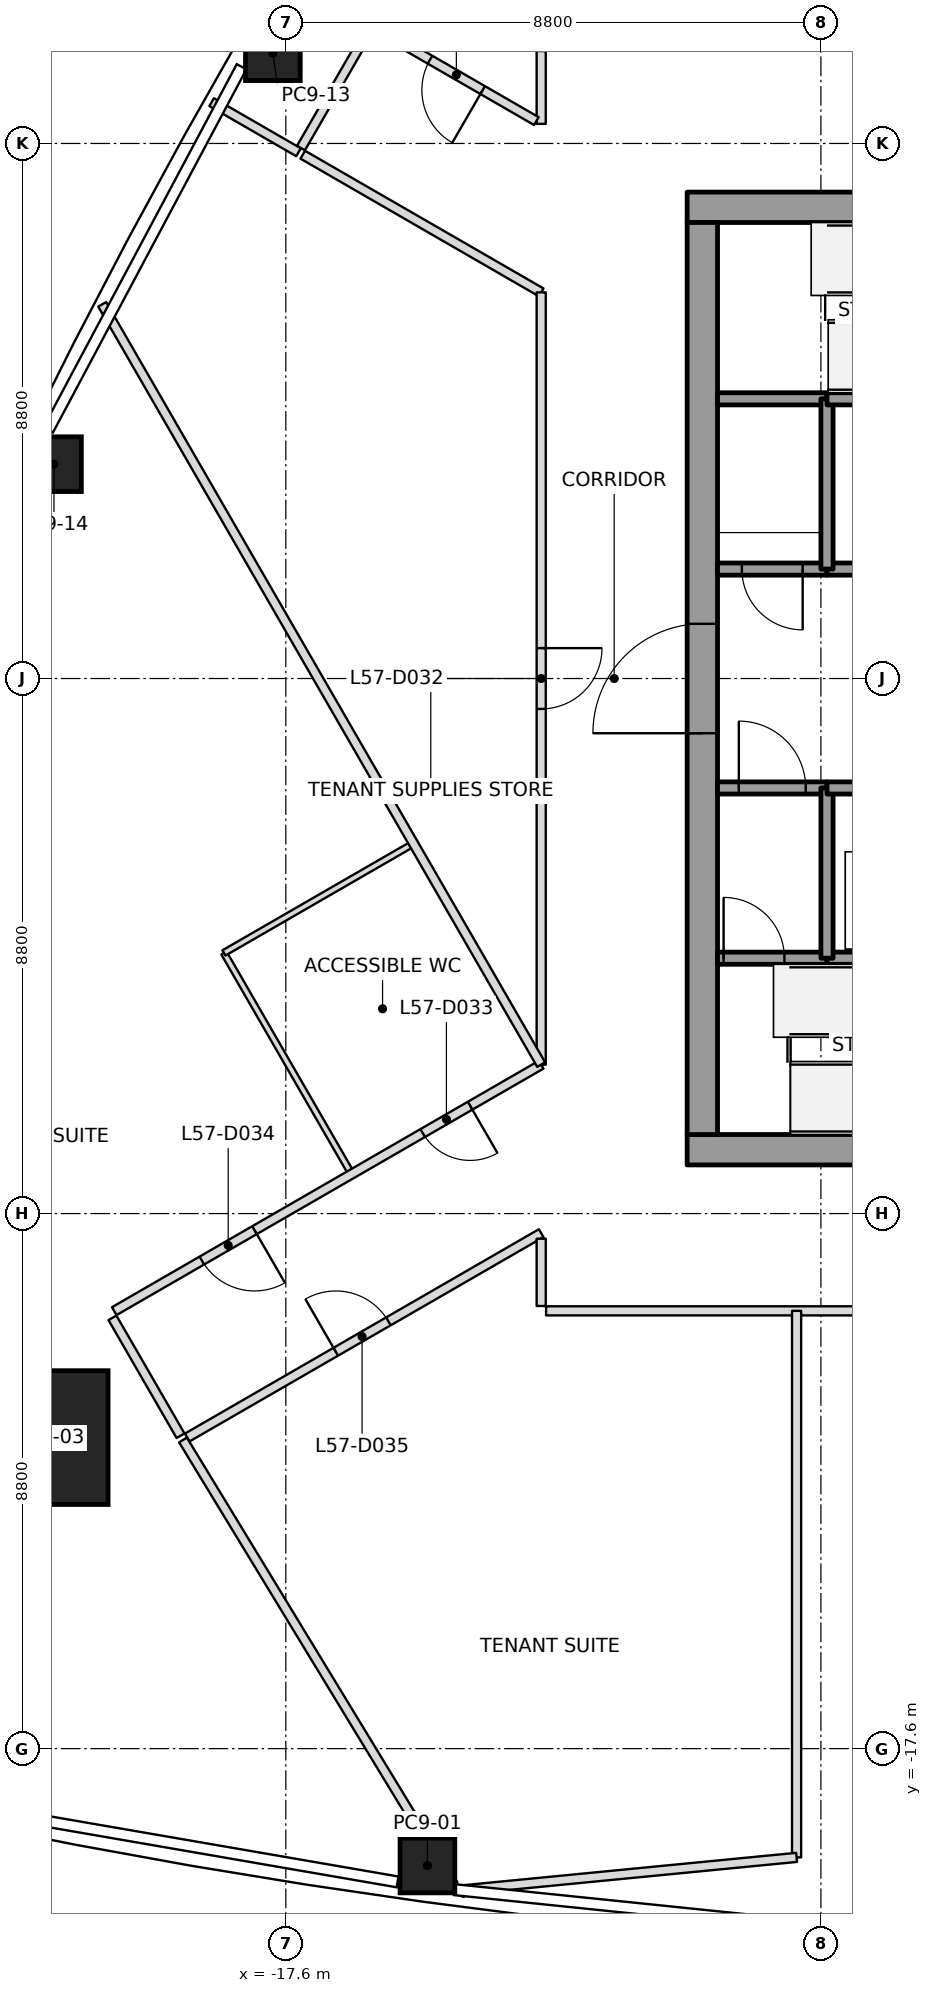
"""IFC4 building model, lengths in metres.
Left out: names, types, materials, properties, quantities, classifications, styles, units other than length and angle.
Written with IfcOpenShell. Run it as: python <this file> out.ifc"""

import sys

from ifc_helpers import new_model, si_unit, direction, frame, frame_2d, origin, origin_2d, place, context, subcontext, project, spatial, rectangle, extrude, element, fill, save


model = new_model("IFC4")
c1 = context("Model", 3, precision=1e-05, world=origin(), true_north=direction((0.0, 1.0)))
c2 = subcontext(c1, "Body", "Model", "MODEL_VIEW")
j1 = project(units=[si_unit("LENGTHUNIT", "METRE"), si_unit("PLANEANGLEUNIT", "RADIAN")], contexts=[c1])
p1 = place(None, origin())
s1 = spatial("IfcSite", under=j1, at=p1, CompositionType="ELEMENT")
p2 = place(p1, origin())
s2 = spatial("IfcBuilding", under=s1, at=p2, CompositionType="ELEMENT")
p3 = place(p2, frame((0.0, 0.0, 255.0)))
s3 = spatial("IfcBuildingStorey", under=s2, at=p3, CompositionType="ELEMENT", Elevation=255.0)
p4 = place(p3, frame((-21.623, -12.484, 0.0), z_axis=(0.027878633223, 0.016043939908, 0.999482553025), x_axis=(0.999611315367, -0.000447457036, -0.02787504211)))
e1 = element("IfcColumn", 1, at=p4, inside=s3, PredefinedType="COLUMN", context=c2, shape_type="SweptSolid", body=[
    extrude(rectangle(XDim=2.2, YDim=2.2, at=origin_2d()), origin(), (0.0, 0.0, 1.0), 4.002),
])
p5 = place(p3, frame((-15.271, -19.522, 0.0), z_axis=(0.017513460473, 0.010373826761, 0.999792809746), x_axis=(-0.990498056196, 0.13660062704, 0.015933278536)))
e2 = element("IfcColumn", 2, at=p5, inside=s3, PredefinedType="COLUMN", context=c2, shape_type="SweptSolid", body=[
    extrude(rectangle(XDim=0.9, YDim=0.9, at=origin_2d()), origin(), (0.0, 0.0, 1.0), 4.001),
])
p6 = place(p3, frame((-17.813, 10.284, 0.0), z_axis=(0.00994807791, -0.005675897212, 0.999934407817), x_axis=(0.499975258324, 0.866039685968, -5.8244404e-05)))
e3 = element("IfcColumn", 3, at=p6, inside=s3, PredefinedType="COLUMN", context=c2, shape_type="SweptSolid", body=[
    extrude(rectangle(XDim=0.9, YDim=0.9, at=origin_2d()), origin(), (0.0, 0.0, 1.0), 4.0),
])
p7 = place(p3, frame((-21.413, 3.525, 0.0), z_axis=(0.014097691364, 0.002013955909, 0.999898594398), x_axis=(0.439572578629, 0.898171387712, -0.008006648038)))
e4 = element("IfcColumn", 4, at=p7, inside=s3, PredefinedType="COLUMN", context=c2, shape_type="SweptSolid", body=[
    extrude(rectangle(XDim=0.9, YDim=0.9, at=origin_2d()), origin(), (0.0, 0.0, 1.0), 4.0),
])
p8 = place(p3, frame((-11.0, -7.75, 0.0), z_axis=(0.0, 0.0, 1.0), x_axis=(1.0, 0.0, 0.0)))
e5 = element("IfcWall", 5, at=p8, inside=s3, PredefinedType="SHEAR", context=c2, shape_type="SweptSolid", body=[
    extrude(rectangle(XDim=22.0, YDim=0.5, at=frame_2d((11.0, 0.0))), origin(), (0.0, 0.0, 1.0), 4.0),
])
p9 = place(p8, frame((10.45, 0.0, 0.0)))
e6 = element("IfcOpeningElement", 6, at=p9, cuts=e5, PredefinedType="OPENING", context=c2, shape_type="SweptSolid", body=[
    extrude(rectangle(XDim=1.1, YDim=2.1, at=frame_2d((0.55, 1.05))), frame((0.0, 0.25, 0.0), z_axis=(0.0, -1.0, 0.0), x_axis=(1.0, 0.0, 0.0)), (0.0, 0.0, 1.0), 0.5),
])
p10 = place(p3, frame((-11.0, 7.75, 0.0), z_axis=(0.0, 0.0, 1.0), x_axis=(1.0, 0.0, 0.0)))
e7 = element("IfcWall", 7, at=p10, inside=s3, PredefinedType="SHEAR", context=c2, shape_type="SweptSolid", body=[
    extrude(rectangle(XDim=22.0, YDim=0.5, at=frame_2d((11.0, 0.0))), origin(), (0.0, 0.0, 1.0), 4.0),
])
p11 = place(p10, frame((10.45, 0.0, 0.0)))
e8 = element("IfcOpeningElement", 8, at=p11, cuts=e7, PredefinedType="OPENING", context=c2, shape_type="SweptSolid", body=[
    extrude(rectangle(XDim=1.1, YDim=2.1, at=frame_2d((0.55, 1.05))), frame((0.0, 0.25, 0.0), z_axis=(0.0, -1.0, 0.0), x_axis=(1.0, 0.0, 0.0)), (0.0, 0.0, 1.0), 0.5),
])
p12 = place(p3, frame((-10.75, -7.5, 0.0), z_axis=(0.0, 0.0, 1.0), x_axis=(0.0, 1.0, 0.0)))
e9 = element("IfcWall", 9, at=p12, inside=s3, PredefinedType="SHEAR", context=c2, shape_type="SweptSolid", body=[
    extrude(rectangle(XDim=15.0, YDim=0.5, at=frame_2d((7.5, 0.0))), origin(), (0.0, 0.0, 1.0), 4.0),
])
p13 = place(p12, frame((6.6, 0.0, 0.0)))
e10 = element("IfcOpeningElement", 10, at=p13, cuts=e9, PredefinedType="OPENING", context=c2, shape_type="SweptSolid", body=[
    extrude(rectangle(XDim=1.8, YDim=2.1, at=frame_2d((0.9, 1.05))), frame((0.0, 0.25, 0.0), z_axis=(0.0, -1.0, 0.0), x_axis=(1.0, 0.0, 0.0)), (0.0, 0.0, 1.0), 0.5),
])
p14 = place(p3, frame((-10.5, -4.6, 0.0), z_axis=(0.0, 0.0, 1.0), x_axis=(1.0, 0.0, 0.0)))
e11 = element("IfcWall", 11, at=p14, inside=s3, PredefinedType="SOLIDWALL", context=c2, shape_type="SweptSolid", body=[
    extrude(rectangle(XDim=1.8, YDim=0.2, at=frame_2d((0.9, 0.0))), origin(), (0.0, 0.0, 1.0), 3.85),
])
p15 = place(p14, frame((0.1, 0.0, 0.0)))
e12 = element("IfcOpeningElement", 12, at=p15, cuts=e11, PredefinedType="OPENING", context=c2, shape_type="SweptSolid", body=[
    extrude(rectangle(XDim=1.0, YDim=2.1, at=frame_2d((0.5, 1.05))), frame((0.0, 0.1, 0.0), z_axis=(0.0, -1.0, 0.0), x_axis=(1.0, 0.0, 0.0)), (0.0, 0.0, 1.0), 0.2),
])
p16 = place(p3, frame((-10.5, -1.8, 0.0), z_axis=(0.0, 0.0, 1.0), x_axis=(1.0, 0.0, 0.0)))
e13 = element("IfcWall", 13, at=p16, inside=s3, PredefinedType="SOLIDWALL", context=c2, shape_type="SweptSolid", body=[
    extrude(rectangle(XDim=1.8, YDim=0.2, at=frame_2d((0.9, 0.0))), origin(), (0.0, 0.0, 1.0), 3.85),
])
p17 = place(p16, frame((0.35, 0.0, 0.0)))
e14 = element("IfcOpeningElement", 14, at=p17, cuts=e13, PredefinedType="OPENING", context=c2, shape_type="SweptSolid", body=[
    extrude(rectangle(XDim=1.1, YDim=2.1, at=frame_2d((0.55, 1.05))), frame((0.0, 0.1, 0.0), z_axis=(0.0, -1.0, 0.0), x_axis=(1.0, 0.0, 0.0)), (0.0, 0.0, 1.0), 0.2),
])
p18 = place(p3, frame((-8.7, 1.8, 0.0), z_axis=(0.0, 0.0, 1.0), x_axis=(-1.0, 0.0, 0.0)))
e15 = element("IfcWall", 15, at=p18, inside=s3, PredefinedType="SOLIDWALL", context=c2, shape_type="SweptSolid", body=[
    extrude(rectangle(XDim=1.8, YDim=0.2, at=frame_2d((0.9, 0.0))), origin(), (0.0, 0.0, 1.0), 3.85),
])
p19 = place(p18, frame((0.4, 0.0, 0.0)))
e16 = element("IfcOpeningElement", 16, at=p19, cuts=e15, PredefinedType="OPENING", context=c2, shape_type="SweptSolid", body=[
    extrude(rectangle(XDim=1.0, YDim=2.1, at=frame_2d((0.5, 1.05))), frame((0.0, 0.1, 0.0), z_axis=(0.0, -1.0, 0.0), x_axis=(1.0, 0.0, 0.0)), (0.0, 0.0, 1.0), 0.2),
])
p20 = place(p3, frame((-8.7, 4.6, 0.0), z_axis=(0.0, 0.0, 1.0), x_axis=(-1.0, 0.0, 0.0)))
e17 = element("IfcWall", 17, at=p20, inside=s3, PredefinedType="SOLIDWALL", context=c2, shape_type="SweptSolid", body=[
    extrude(rectangle(XDim=1.8, YDim=0.2, at=frame_2d((0.9, 0.0))), origin(), (0.0, 0.0, 1.0), 3.85),
])
p21 = place(p3, frame((-8.7, -4.6, 0.0), z_axis=(0.0, 0.0, 1.0), x_axis=(1.0, 0.0, 0.0)))
e18 = element("IfcWall", 18, at=p21, inside=s3, PredefinedType="SOLIDWALL", context=c2, shape_type="SweptSolid", body=[
    extrude(rectangle(XDim=2.6, YDim=0.2, at=frame_2d((1.3, 0.0))), origin(), (0.0, 0.0, 1.0), 3.85),
])
p22 = place(p3, frame((-8.7, -4.6, 0.0), z_axis=(0.0, 0.0, 1.0), x_axis=(0.0, 1.0, 0.0)))
e19 = element("IfcWall", 19, at=p22, inside=s3, PredefinedType="SOLIDWALL", context=c2, shape_type="SweptSolid", body=[
    extrude(rectangle(XDim=2.8, YDim=0.2, at=frame_2d((1.4, 0.0))), origin(), (0.0, 0.0, 1.0), 3.85),
])
p23 = place(p3, frame((-8.7, -1.8, 0.0), z_axis=(0.0, 0.0, 1.0), x_axis=(1.0, 0.0, 0.0)))
e20 = element("IfcWall", 20, at=p23, inside=s3, PredefinedType="SOLIDWALL", context=c2, shape_type="SweptSolid", body=[
    extrude(rectangle(XDim=2.6, YDim=0.2, at=frame_2d((1.3, 0.0))), origin(), (0.0, 0.0, 1.0), 3.85),
])
p24 = place(p23, frame((0.75, 0.0, 0.0)))
e21 = element("IfcOpeningElement", 21, at=p24, cuts=e20, PredefinedType="OPENING", context=c2, shape_type="SweptSolid", body=[
    extrude(rectangle(XDim=1.1, YDim=2.1, at=frame_2d((0.55, 1.05))), frame((0.0, 0.1, 0.0), z_axis=(0.0, -1.0, 0.0), x_axis=(1.0, 0.0, 0.0)), (0.0, 0.0, 1.0), 0.2),
])
p25 = place(p3, frame((-8.7, 1.8, 0.0), z_axis=(0.0, 0.0, 1.0), x_axis=(1.0, 0.0, 0.0)))
e22 = element("IfcWall", 22, at=p25, inside=s3, PredefinedType="SOLIDWALL", context=c2, shape_type="SweptSolid", body=[
    extrude(rectangle(XDim=5.2, YDim=0.2, at=frame_2d((2.6, 0.0))), origin(), (0.0, 0.0, 1.0), 3.85),
])
p26 = place(p25, frame((2.15, 0.0, 0.0)))
e23 = element("IfcOpeningElement", 23, at=p26, cuts=e22, PredefinedType="OPENING", context=c2, shape_type="SweptSolid", body=[
    extrude(rectangle(XDim=0.9, YDim=2.1, at=frame_2d((0.45, 1.05))), frame((0.0, 0.1, 0.0), z_axis=(0.0, -1.0, 0.0), x_axis=(1.0, 0.0, 0.0)), (0.0, 0.0, 1.0), 0.2),
])
p27 = place(p3, frame((-8.7, 4.6, 0.0), z_axis=(0.0, 0.0, 1.0), x_axis=(0.0, -1.0, 0.0)))
e24 = element("IfcWall", 24, at=p27, inside=s3, PredefinedType="SOLIDWALL", context=c2, shape_type="SweptSolid", body=[
    extrude(rectangle(XDim=2.8, YDim=0.2, at=frame_2d((1.4, 0.0))), origin(), (0.0, 0.0, 1.0), 3.85),
])
p28 = place(p3, frame((-4.3, 4.6, 0.0), z_axis=(0.0, 0.0, 1.0), x_axis=(-1.0, 0.0, 0.0)))
e25 = element("IfcWall", 25, at=p28, inside=s3, PredefinedType="SOLIDWALL", context=c2, shape_type="SweptSolid", body=[
    extrude(rectangle(XDim=4.4, YDim=0.2, at=frame_2d((2.2, 0.0))), origin(), (0.0, 0.0, 1.0), 3.85),
])
p29 = place(p3, frame((-13.4, -6.351, 0.0), z_axis=(0.0, 0.0, 1.0), x_axis=(-0.500001511722, 0.866024530989, 0.0)))
e26 = element("IfcWall", 26, at=p29, inside=s3, PredefinedType="PARTITIONING", context=c2, shape_type="SweptSolid", body=[
    extrude(rectangle(XDim=14.439, YDim=0.15, at=frame_2d((7.22, 0.0))), origin(), (0.0, 0.0, 1.0), 3.234),
])
p30 = place(p3, frame((-19.291, -12.523, 0.0), z_axis=(0.0, 0.0, 1.0), x_axis=(0.519733387124, -0.854328511937, 0.0)))
e27 = element("IfcWall", 27, at=p30, inside=s3, PredefinedType="PARTITIONING", context=c2, shape_type="SweptSolid", body=[
    extrude(rectangle(XDim=8.56, YDim=0.15, at=frame_2d((4.28, 0.0))), origin(), (0.0, 0.0, 1.0), 3.3),
])
p31 = place(p3, frame((-17.391, 8.655, 0.0), z_axis=(0.0, 0.0, 1.0), x_axis=(-0.865966208357, 0.500102515474, 0.0)))
e28 = element("IfcWall", 28, at=p31, inside=s3, PredefinedType="PARTITIONING", context=c2, shape_type="SweptSolid", body=[
    extrude(rectangle(XDim=1.65, YDim=0.15, at=frame_2d((0.825, 0.0))), origin(), (0.0, 0.0, 1.0), 3.234),
])
p32 = place(p3, frame((-9.2, -10.4, 0.0), z_axis=(0.0, 0.0, 1.0), x_axis=(0.0, -1.0, 0.0)))
e29 = element("IfcWall", 29, at=p32, inside=s3, PredefinedType="PARTITIONING", context=c2, shape_type="SweptSolid", body=[
    extrude(rectangle(XDim=8.989, YDim=0.15, at=frame_2d((4.494, 0.0))), origin(), (0.0, 0.0, 1.0), 3.3),
])
p33 = place(p3, frame((-9.2, -19.389, 0.0), z_axis=(0.0, 0.0, 1.0), x_axis=(-0.995304202409, -0.096796408342, 0.0)))
e30 = element("IfcWall", 30, at=p33, inside=s3, PredefinedType="PARTITIONING", context=c2, shape_type="SweptSolid", body=[
    extrude(rectangle(XDim=5.519, YDim=0.15, at=frame_2d((2.759, 0.0))), origin(), (0.0, 0.0, 1.0), 3.234),
])
p34 = place(p3, frame((-14.743, -20.01, 0.0), z_axis=(0.0, 0.0, 1.0), x_axis=(0.418254272616, 0.908329985984, 0.0)))
e31 = element("IfcWall", 31, at=p34, inside=s3, PredefinedType="PARTITIONING", context=c2, shape_type="SweptSolid", body=[
    extrude(rectangle(XDim=0.115, YDim=0.15, at=frame_2d((0.058, 0.0))), origin(), (0.0, 0.0, 1.0), 3.3),
])
p35 = place(p3, frame((-20.451, -10.514, 0.0), z_axis=(0.0, 0.0, 1.0), x_axis=(0.49994888933, -0.866054910533, 0.0)))
e32 = element("IfcWall", 32, at=p35, inside=s3, PredefinedType="PARTITIONING", context=c2, shape_type="SweptSolid", body=[
    extrude(rectangle(XDim=2.24, YDim=0.15, at=frame_2d((1.12, 0.0))), origin(), (0.0, 0.0, 1.0), 3.233),
])
p36 = place(p3, frame((-13.4, -6.351, 0.0), z_axis=(0.0, 0.0, 1.0), x_axis=(-0.866035161949, -0.499983097982, 0.0)))
e33 = element("IfcWall", 33, at=p36, inside=s3, PredefinedType="PARTITIONING", context=c2, shape_type="SweptSolid", body=[
    extrude(rectangle(XDim=8.108, YDim=0.15, at=frame_2d((4.054, 0.0))), origin(), (0.0, 0.0, 1.0), 3.3),
])
p37 = place(p36, frame((1.35, 0.0, 0.0)))
e34 = element("IfcOpeningElement", 34, at=p37, cuts=e33, PredefinedType="OPENING", context=c2, shape_type="SweptSolid", body=[
    extrude(rectangle(XDim=0.9, YDim=2.1, at=frame_2d((0.45, 1.05))), frame((0.0, 0.075, 0.0), z_axis=(0.0, -1.0, 0.0), x_axis=(1.0, 0.0, 0.0)), (0.0, 0.0, 1.0), 0.15),
])
p38 = place(p36, frame((5.444, 0.0, 0.0)))
e35 = element("IfcOpeningElement", 35, at=p38, cuts=e33, PredefinedType="OPENING", context=c2, shape_type="SweptSolid", body=[
    extrude(rectangle(XDim=1.0, YDim=2.1, at=frame_2d((0.5, 1.05))), frame((0.0, 0.075, 0.0), z_axis=(0.0, -1.0, 0.0), x_axis=(1.0, 0.0, 0.0)), (0.0, 0.0, 1.0), 0.15),
])
p39 = place(p3, frame((-19.222, -12.483, 0.0), z_axis=(0.0, 0.0, 1.0), x_axis=(0.866026533947, 0.499998042495, 0.0)))
e36 = element("IfcWall", 36, at=p39, inside=s3, PredefinedType="PARTITIONING", context=c2, shape_type="SweptSolid", body=[
    extrude(rectangle(XDim=6.723, YDim=0.15, at=frame_2d((3.361, 0.0))), origin(), (0.0, 0.0, 1.0), 3.233),
])
p40 = place(p39, frame((2.821, 0.0, 0.0)))
e37 = element("IfcOpeningElement", 37, at=p40, cuts=e36, PredefinedType="OPENING", context=c2, shape_type="SweptSolid", body=[
    extrude(rectangle(XDim=1.0, YDim=2.1, at=frame_2d((0.5, 1.05))), frame((0.0, 0.075, 0.0), z_axis=(0.0, -1.0, 0.0), x_axis=(1.0, 0.0, 0.0)), (0.0, 0.0, 1.0), 0.15),
])
p41 = place(p3, frame((-13.4, -9.214, 0.0), z_axis=(0.0, 0.0, 1.0), x_axis=(0.0, -1.0, 0.0)))
e38 = element("IfcWall", 38, at=p41, inside=s3, PredefinedType="PARTITIONING", context=c2, shape_type="SweptSolid", body=[
    extrude(rectangle(XDim=1.106, YDim=0.15, at=frame_2d((0.553, 0.0))), origin(), (0.0, 0.0, 1.0), 3.233),
])
p42 = place(p3, frame((-16.231, 10.664, 0.0), z_axis=(0.0, 0.0, 1.0), x_axis=(-0.500030632641, -0.866007717299, 0.0)))
e39 = element("IfcWall", 39, at=p42, inside=s3, PredefinedType="PARTITIONING", context=c2, shape_type="SweptSolid", body=[
    extrude(rectangle(XDim=2.24, YDim=0.15, at=frame_2d((1.12, 0.0))), origin(), (0.0, 0.0, 1.0), 3.3),
])
p43 = place(p3, frame((-17.322, 8.615, 0.0), z_axis=(0.0, 0.0, 1.0), x_axis=(0.866038353239, -0.499977570215, 0.0)))
e40 = element("IfcWall", 40, at=p43, inside=s3, PredefinedType="PARTITIONING", context=c2, shape_type="SweptSolid", body=[
    extrude(rectangle(XDim=4.529, YDim=0.15, at=frame_2d((2.264, 0.0))), origin(), (0.0, 0.0, 1.0), 3.3),
])
p44 = place(p3, frame((-13.4, 6.351, 0.0), z_axis=(0.0, 0.0, 1.0), x_axis=(0.0, -1.0, 0.0)))
e41 = element("IfcWall", 41, at=p44, inside=s3, PredefinedType="PARTITIONING", context=c2, shape_type="SweptSolid", body=[
    extrude(rectangle(XDim=12.702, YDim=0.15, at=frame_2d((6.351, 0.0))), origin(), (0.0, 0.0, 1.0), 3.3),
])
p45 = place(p44, frame((5.851, 0.0, 0.0)))
e42 = element("IfcOpeningElement", 42, at=p45, cuts=e41, PredefinedType="OPENING", context=c2, shape_type="SweptSolid", body=[
    extrude(rectangle(XDim=1.0, YDim=2.1, at=frame_2d((0.5, 1.05))), frame((0.0, 0.075, 0.0), z_axis=(0.0, -1.0, 0.0), x_axis=(1.0, 0.0, 0.0)), (0.0, 0.0, 1.0), 0.15),
])
p46 = place(p3, frame((-13.4, 10.32, 0.0), z_axis=(0.0, 0.0, 1.0), x_axis=(0.0, -1.0, 0.0)))
e43 = element("IfcWall", 43, at=p46, inside=s3, PredefinedType="PARTITIONING", context=c2, shape_type="SweptSolid", body=[
    extrude(rectangle(XDim=1.198, YDim=0.15, at=frame_2d((0.599, 0.0))), origin(), (0.0, 0.0, 1.0), 3.3),
])
p47 = place(p3, frame((-13.479, 9.168, 0.0), z_axis=(0.0, 0.0, 1.0), x_axis=(-0.866013691268, 0.500020286125, 0.0)))
e44 = element("IfcWall", 44, at=p47, inside=s3, PredefinedType="PARTITIONING", context=c2, shape_type="SweptSolid", body=[
    extrude(rectangle(XDim=3.051, YDim=0.15, at=frame_2d((1.525, 0.0))), origin(), (0.0, 0.0, 1.0), 3.3),
])
p48 = place(p47, frame((1.02, 0.0, 0.0)))
e45 = element("IfcOpeningElement", 45, at=p48, cuts=e44, PredefinedType="OPENING", context=c2, shape_type="SweptSolid", body=[
    extrude(rectangle(XDim=1.0, YDim=2.1, at=frame_2d((0.5, 1.05))), frame((0.0, 0.075, 0.0), z_axis=(0.0, -1.0, 0.0), x_axis=(1.0, 0.0, 0.0)), (0.0, 0.0, 1.0), 0.15),
])
p49 = place(p3, frame((-13.32, -10.4, 0.0), z_axis=(0.0, 0.0, 1.0), x_axis=(1.0, 0.0, 0.0)))
e46 = element("IfcWall", 46, at=p49, inside=s3, PredefinedType="PARTITIONING", context=c2, shape_type="SweptSolid", body=[
    extrude(rectangle(XDim=12.12, YDim=0.15, at=frame_2d((6.06, 0.0))), origin(), (0.0, 0.0, 1.0), 3.167),
])
p50 = place(p3, frame((-16.533, -8.125, 0.0), z_axis=(0.0, 0.0, 1.0), x_axis=(-0.499967396439, 0.866044226641, 0.0)))
e47 = element("IfcWall", 47, at=p50, inside=s3, PredefinedType="PARTITIONING", context=c2, shape_type="SweptSolid", body=[
    extrude(rectangle(XDim=4.17, YDim=0.1, at=frame_2d((2.085, 0.0))), origin(), (0.0, 0.0, 1.0), 3.3),
])
p51 = place(p3, frame((-18.618, -4.513, 0.0), z_axis=(0.0, 0.0, 1.0), x_axis=(0.866042098853, 0.499971082179, 0.0)))
e48 = element("IfcWall", 48, at=p51, inside=s3, PredefinedType="PARTITIONING", context=c2, shape_type="SweptSolid", body=[
    extrude(rectangle(XDim=3.57, YDim=0.1, at=frame_2d((1.785, 0.0))), origin(), (0.0, 0.0, 1.0), 3.3),
])
p52 = place(p48, origin())
e49 = element("IfcDoor", 49, at=p52, inside=s3, OperationType="SINGLE_SWING_RIGHT", PredefinedType="DOOR", context=c2, shape_type="SweptSolid", body=[
    extrude(rectangle(XDim=1.0, YDim=2.1, at=frame_2d((0.5, 1.05))), frame((0.0, 0.025, 0.0), z_axis=(0.0, -1.0, 0.0), x_axis=(1.0, 0.0, 0.0)), (0.0, 0.0, 1.0), 0.05),
])
fill(e45, e49)
p53 = place(p45, origin())
e50 = element("IfcDoor", 50, at=p53, inside=s3, OperationType="SINGLE_SWING_LEFT", PredefinedType="DOOR", context=c2, shape_type="SweptSolid", body=[
    extrude(rectangle(XDim=1.0, YDim=2.1, at=frame_2d((0.5, 1.05))), frame((0.0, 0.025, 0.0), z_axis=(0.0, -1.0, 0.0), x_axis=(1.0, 0.0, 0.0)), (0.0, 0.0, 1.0), 0.05),
])
fill(e42, e50)
p54 = place(p37, origin())
e51 = element("IfcDoor", 51, at=p54, inside=s3, OperationType="SINGLE_SWING_LEFT", PredefinedType="DOOR", context=c2, shape_type="SweptSolid", body=[
    extrude(rectangle(XDim=0.9, YDim=2.1, at=frame_2d((0.45, 1.05))), frame((0.0, 0.025, 0.0), z_axis=(0.0, -1.0, 0.0), x_axis=(1.0, 0.0, 0.0)), (0.0, 0.0, 1.0), 0.05),
])
fill(e34, e51)
p55 = place(p38, origin())
e52 = element("IfcDoor", 52, at=p55, inside=s3, OperationType="SINGLE_SWING_LEFT", PredefinedType="DOOR", context=c2, shape_type="SweptSolid", body=[
    extrude(rectangle(XDim=1.0, YDim=2.1, at=frame_2d((0.5, 1.05))), frame((0.0, 0.025, 0.0), z_axis=(0.0, -1.0, 0.0), x_axis=(1.0, 0.0, 0.0)), (0.0, 0.0, 1.0), 0.05),
])
fill(e35, e52)
p56 = place(p40, origin())
e53 = element("IfcDoor", 53, at=p56, inside=s3, OperationType="SINGLE_SWING_LEFT", PredefinedType="DOOR", context=c2, shape_type="SweptSolid", body=[
    extrude(rectangle(XDim=1.0, YDim=2.1, at=frame_2d((0.5, 1.05))), frame((0.0, 0.025, 0.0), z_axis=(0.0, -1.0, 0.0), x_axis=(1.0, 0.0, 0.0)), (0.0, 0.0, 1.0), 0.05),
])
fill(e37, e53)
p57 = place(p17, origin())
e54 = element("IfcDoor", 54, at=p57, inside=s3, OperationType="SINGLE_SWING_LEFT", PredefinedType="DOOR", context=c2, shape_type="SweptSolid", body=[
    extrude(rectangle(XDim=1.1, YDim=2.1, at=frame_2d((0.55, 1.05))), frame((0.0, 0.025, 0.0), z_axis=(0.0, -1.0, 0.0), x_axis=(1.0, 0.0, 0.0)), (0.0, 0.0, 1.0), 0.05),
])
fill(e14, e54)
p58 = place(p19, origin())
e55 = element("IfcDoor", 55, at=p58, inside=s3, OperationType="SINGLE_SWING_RIGHT", PredefinedType="DOOR", context=c2, shape_type="SweptSolid", body=[
    extrude(rectangle(XDim=1.0, YDim=2.1, at=frame_2d((0.5, 1.05))), frame((0.0, 0.025, 0.0), z_axis=(0.0, -1.0, 0.0), x_axis=(1.0, 0.0, 0.0)), (0.0, 0.0, 1.0), 0.05),
])
fill(e16, e55)
p59 = place(p15, origin())
e56 = element("IfcDoor", 56, at=p59, inside=s3, OperationType="SINGLE_SWING_LEFT", PredefinedType="DOOR", context=c2, shape_type="SweptSolid", body=[
    extrude(rectangle(XDim=1.0, YDim=2.1, at=frame_2d((0.5, 1.05))), frame((0.0, 0.025, 0.0), z_axis=(0.0, -1.0, 0.0), x_axis=(1.0, 0.0, 0.0)), (0.0, 0.0, 1.0), 0.05),
])
fill(e12, e56)
p60 = place(p13, origin())
e57 = element("IfcDoor", 57, at=p60, inside=s3, OperationType="DOUBLE_DOOR_SINGLE_SWING", PredefinedType="DOOR", context=c2, shape_type="SweptSolid", body=[
    extrude(rectangle(XDim=1.8, YDim=2.1, at=frame_2d((0.9, 1.05))), frame((0.0, 0.025, 0.0), z_axis=(0.0, -1.0, 0.0), x_axis=(1.0, 0.0, 0.0)), (0.0, 0.0, 1.0), 0.05),
])
fill(e10, e57)
save(model, sys.argv[1])
